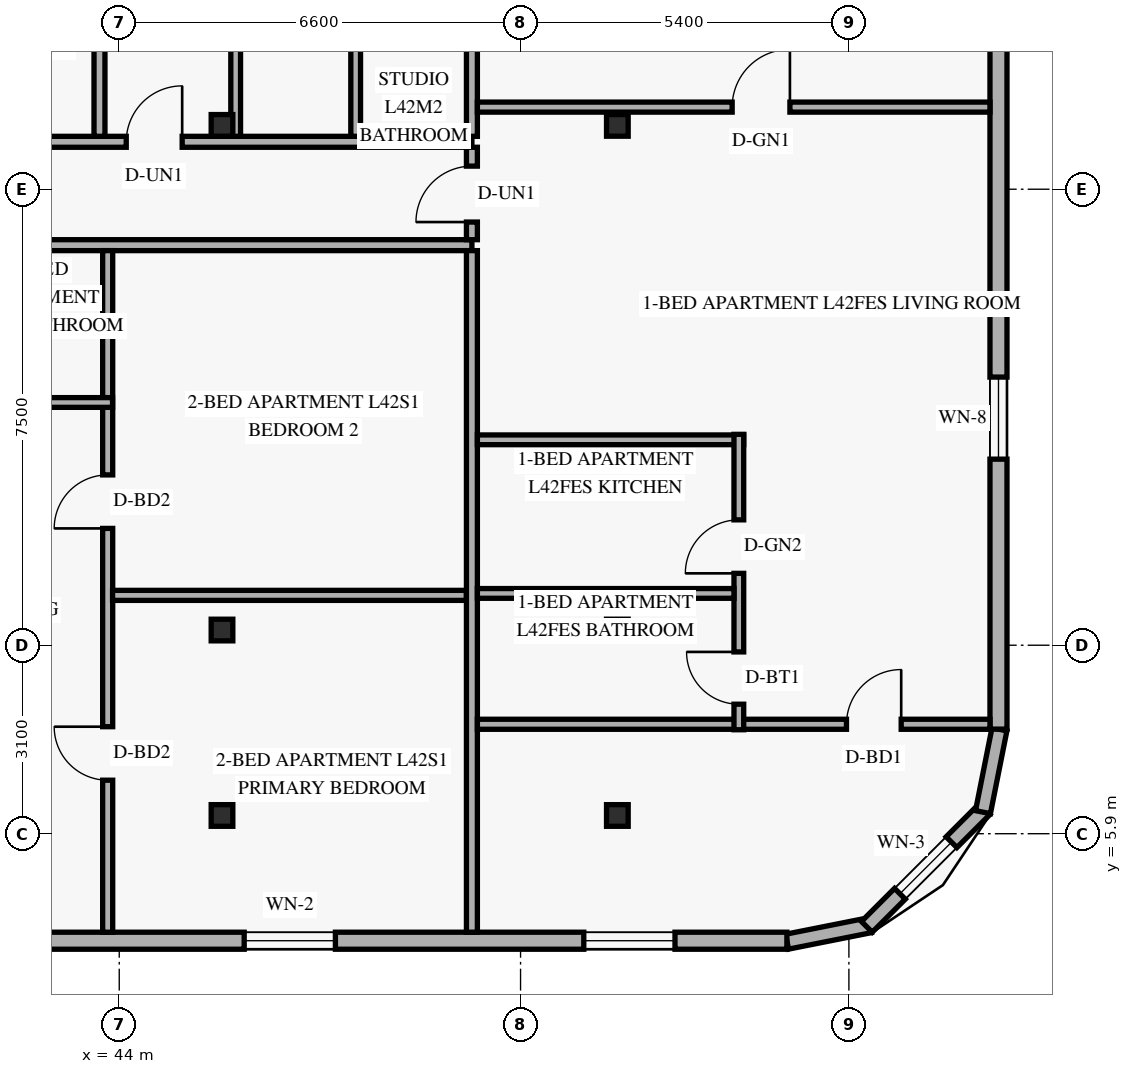
"""IFC4 building model, lengths in metres.
Left out: names, types, materials, properties, quantities, classifications, styles, units other than length and angle.
Written with IfcOpenShell. Run it as: python <this file> out.ifc"""

import sys

from ifc_helpers import new_model, si_unit, direction, frame, frame_2d, origin, origin_2d, place, context, subcontext, project, spatial, rectangle, hollow_rectangle, extrude, element, fill, save


model = new_model("IFC4")
c1 = context("Model", 3, precision=1e-05, world=origin(), true_north=direction((0.0, 1.0)))
c2 = subcontext(c1, "Body", "Model", "MODEL_VIEW")
j1 = project(units=[si_unit("LENGTHUNIT", "METRE"), si_unit("PLANEANGLEUNIT", "RADIAN")], contexts=[c1])
p1 = place(None, origin())
s1 = spatial("IfcSite", under=j1, at=p1, CompositionType="ELEMENT")
p2 = place(p1, origin())
s2 = spatial("IfcBuilding", under=s1, at=p2, CompositionType="ELEMENT")
p3 = place(p2, frame((0.0, 0.0, 162.6)))
s3 = spatial("IfcBuildingStorey", under=s2, at=p3, CompositionType="ELEMENT", Elevation=162.6)
for number, where, z_axis, x_axis in (
    (1, (45.627, 6.2, 0.0), (0.035, 0.0, 0.999), (0.0, 1.0, 0.0)),
    (2, (45.627, 9.25, 0.0), (0.035, 0.0, 0.999), (0.0, 1.0, 0.0)),
    (3, (45.627, 17.55, 0.0), (0.035, 0.0, 0.999), (0.0, 1.0, 0.0)),
):
    element("IfcColumn", number, at=place(p3, frame(where, z_axis=z_axis, x_axis=x_axis)), inside=s3, PredefinedType="COLUMN", context=c2, shape_type="SweptSolid", body=[
        extrude(hollow_rectangle(XDim=0.356, YDim=0.356, WallThickness=0.016, at=origin_2d()), origin(), (0.0, 0.0, 1.0), 3.602),
    ])
for number, where, z_axis, x_axis in (
    (4, (52.088, 6.2, 0.0), (0.058, 0.0, 0.998), (0.0, 1.0, 0.0)),
    (5, (52.088, 9.25, 0.0), (0.058, 0.0, 0.998), (0.0, 1.0, 0.0)),
    (6, (52.088, 17.55, 0.0), (0.058, 0.0, 0.998), (0.0, 1.0, 0.0)),
):
    element("IfcColumn", number, at=place(p3, frame(where, z_axis=z_axis, x_axis=x_axis)), inside=s3, PredefinedType="COLUMN", context=c2, shape_type="SweptSolid", body=[
        extrude(hollow_rectangle(XDim=0.356, YDim=0.356, WallThickness=0.016, at=origin_2d()), origin(), (0.0, 0.0, 1.0), 3.606),
    ])
p4 = place(p3, frame((54.983, 4.124, 0.0), z_axis=(0.0, 0.0, 1.0), x_axis=(0.980809899341, 0.19496651342, 0.0)))
e7 = element("IfcWall", 7, at=p4, inside=s3, PredefinedType="SOLIDWALL", context=c2, shape_type="SweptSolid", body=[
    extrude(rectangle(XDim=1.389, YDim=0.25, at=frame_2d((0.694, 0.0))), origin(), (0.0, 0.0, 1.0), 3.36),
])
p5 = place(p3, frame((56.295, 4.368, 0.0), z_axis=(0.0, 0.0, 1.0), x_axis=(0.707106781187, 0.707106781187, 0.0)))
e8 = element("IfcWall", 8, at=p5, inside=s3, PredefinedType="SOLIDWALL", context=c2, shape_type="SweptSolid", body=[
    extrude(rectangle(XDim=2.739, YDim=0.25, at=frame_2d((1.37, 0.0))), origin(), (0.0, 0.0, 1.0), 3.36),
])
p6 = place(p5, frame((0.77, 0.0, 0.85)))
e9 = element("IfcOpeningElement", 9, at=p6, cuts=e8, PredefinedType="OPENING", context=c2, shape_type="SweptSolid", body=[
    extrude(rectangle(XDim=1.2, YDim=1.5, at=frame_2d((0.6, 0.75))), frame((0.0, 0.135, 0.0), z_axis=(0.0, -1.0, 0.0), x_axis=(1.0, 0.0, 0.0)), (0.0, 0.0, 1.0), 0.27),
])
p7 = place(p3, frame((58.205, 6.254, 0.0), z_axis=(0.0, 0.0, 1.0), x_axis=(0.19496651342, 0.980809899341, 0.0)))
e10 = element("IfcWall", 10, at=p7, inside=s3, PredefinedType="SOLIDWALL", context=c2, shape_type="SweptSolid", body=[
    extrude(rectangle(XDim=1.389, YDim=0.25, at=frame_2d((0.694, 0.0))), origin(), (0.0, 0.0, 1.0), 3.36),
])
p8 = place(p3, frame((34.4, 4.14, 0.0), z_axis=(0.0, 0.0, 1.0), x_axis=(1.0, 0.0, 0.0)))
e11 = element("IfcWall", 11, at=p8, inside=s3, PredefinedType="SOLIDWALL", context=c2, shape_type="SweptSolid", body=[
    extrude(rectangle(XDim=20.58, YDim=0.28, at=frame_2d((10.29, 0.0))), origin(), (0.0, 0.0, 1.0), 3.36),
])
p9 = place(p8, frame((1.335, 0.0, 0.85)))
e12 = element("IfcOpeningElement", 12, at=p9, cuts=e11, PredefinedType="OPENING", context=c2, shape_type="SweptSolid", body=[
    extrude(rectangle(XDim=1.5, YDim=1.55, at=frame_2d((0.75, 0.775))), frame((0.0, 0.15, 0.0), z_axis=(0.0, -1.0, 0.0), x_axis=(1.0, 0.0, 0.0)), (0.0, 0.0, 1.0), 0.3),
])
p10 = place(p8, frame((5.53, 0.0, 0.85)))
e13 = element("IfcOpeningElement", 13, at=p10, cuts=e11, PredefinedType="OPENING", context=c2, shape_type="SweptSolid", body=[
    extrude(rectangle(XDim=1.5, YDim=1.55, at=frame_2d((0.75, 0.775))), frame((0.0, 0.15, 0.0), z_axis=(0.0, -1.0, 0.0), x_axis=(1.0, 0.0, 0.0)), (0.0, 0.0, 1.0), 0.3),
])
p11 = place(p8, frame((11.655, 0.0, 0.85)))
e14 = element("IfcOpeningElement", 14, at=p11, cuts=e11, PredefinedType="OPENING", context=c2, shape_type="SweptSolid", body=[
    extrude(rectangle(XDim=1.5, YDim=1.55, at=frame_2d((0.75, 0.775))), frame((0.0, 0.15, 0.0), z_axis=(0.0, -1.0, 0.0), x_axis=(1.0, 0.0, 0.0)), (0.0, 0.0, 1.0), 0.3),
])
p12 = place(p8, frame((17.24, 0.0, 0.85)))
e15 = element("IfcOpeningElement", 15, at=p12, cuts=e11, PredefinedType="OPENING", context=c2, shape_type="SweptSolid", body=[
    extrude(rectangle(XDim=1.5, YDim=1.55, at=frame_2d((0.75, 0.775))), frame((0.0, 0.15, 0.0), z_axis=(0.0, -1.0, 0.0), x_axis=(1.0, 0.0, 0.0)), (0.0, 0.0, 1.0), 0.3),
])
p13 = place(p3, frame((58.46, 7.62, 0.0), z_axis=(0.0, 0.0, 1.0), x_axis=(0.0, 1.0, 0.0)))
e16 = element("IfcWall", 16, at=p13, inside=s3, PredefinedType="SOLIDWALL", context=c2, shape_type="SweptSolid", body=[
    extrude(rectangle(XDim=32.76, YDim=0.28, at=frame_2d((16.38, 0.0))), origin(), (0.0, 0.0, 1.0), 3.36),
])
p14 = place(p13, frame((4.44, 0.0, 0.85)))
e17 = element("IfcOpeningElement", 17, at=p14, cuts=e16, PredefinedType="OPENING", context=c2, shape_type="SweptSolid", body=[
    extrude(rectangle(XDim=1.35, YDim=1.55, at=frame_2d((0.675, 0.775))), frame((0.0, 0.15, 0.0), z_axis=(0.0, -1.0, 0.0), x_axis=(1.0, 0.0, 0.0)), (0.0, 0.0, 1.0), 0.3),
])
p15 = place(p13, frame((12.23, 0.0, 0.85)))
e18 = element("IfcOpeningElement", 18, at=p15, cuts=e16, PredefinedType="OPENING", context=c2, shape_type="SweptSolid", body=[
    extrude(rectangle(XDim=1.35, YDim=1.55, at=frame_2d((0.675, 0.775))), frame((0.0, 0.15, 0.0), z_axis=(0.0, -1.0, 0.0), x_axis=(1.0, 0.0, 0.0)), (0.0, 0.0, 1.0), 0.3),
])
p16 = place(p13, frame((18.373, 0.0, 0.85)))
e19 = element("IfcOpeningElement", 19, at=p16, cuts=e16, PredefinedType="OPENING", context=c2, shape_type="SweptSolid", body=[
    extrude(rectangle(XDim=1.35, YDim=1.55, at=frame_2d((0.675, 0.775))), frame((0.0, 0.15, 0.0), z_axis=(0.0, -1.0, 0.0), x_axis=(1.0, 0.0, 0.0)), (0.0, 0.0, 1.0), 0.3),
])
p17 = place(p13, frame((26.963, 0.0, 0.85)))
e20 = element("IfcOpeningElement", 20, at=p17, cuts=e16, PredefinedType="OPENING", context=c2, shape_type="SweptSolid", body=[
    extrude(rectangle(XDim=1.35, YDim=1.55, at=frame_2d((0.675, 0.775))), frame((0.0, 0.15, 0.0), z_axis=(0.0, -1.0, 0.0), x_axis=(1.0, 0.0, 0.0)), (0.0, 0.0, 1.0), 0.3),
])
p18 = place(p3, frame((37.633, 15.58, 0.0), z_axis=(0.0, 0.0, 1.0), x_axis=(1.0, 0.0, 0.0)))
e21 = element("IfcWall", 21, at=p18, inside=s3, PredefinedType="STANDARD", context=c2, shape_type="SweptSolid", body=[
    extrude(rectangle(XDim=12.167, YDim=0.18, at=frame_2d((6.084, 0.0))), origin(), (0.0, 0.0, 1.0), 2.73),
])
p19 = place(p18, frame((0.327, 0.0, 0.0)))
e22 = element("IfcOpeningElement", 22, at=p19, cuts=e21, PredefinedType="OPENING", context=c2, shape_type="SweptSolid", body=[
    extrude(rectangle(XDim=0.92, YDim=2.15, at=frame_2d((0.46, 1.075))), frame((0.0, 0.1, 0.0), z_axis=(0.0, -1.0, 0.0), x_axis=(1.0, 0.0, 0.0)), (0.0, 0.0, 1.0), 0.2),
])
p20 = place(p3, frame((37.64, 17.28, 0.0), z_axis=(0.0, 0.0, 1.0), x_axis=(1.0, 0.0, 0.0)))
e23 = element("IfcWall", 23, at=p20, inside=s3, PredefinedType="STANDARD", context=c2, shape_type="SweptSolid", body=[
    extrude(rectangle(XDim=12.16, YDim=0.18, at=frame_2d((6.08, 0.0))), origin(), (0.0, 0.0, 1.0), 2.73),
])
p21 = place(p20, frame((6.475, 0.0, 0.0)))
e24 = element("IfcOpeningElement", 24, at=p21, cuts=e23, PredefinedType="OPENING", context=c2, shape_type="SweptSolid", body=[
    extrude(rectangle(XDim=0.92, YDim=2.15, at=frame_2d((0.46, 1.075))), frame((0.0, 0.1, 0.0), z_axis=(0.0, -1.0, 0.0), x_axis=(1.0, 0.0, 0.0)), (0.0, 0.0, 1.0), 0.2),
])
p22 = place(p3, frame((43.81, 4.28, 0.0), z_axis=(0.0, 0.0, 1.0), x_axis=(0.0, 1.0, 0.0)))
e25 = element("IfcWall", 25, at=p22, inside=s3, PredefinedType="PARTITIONING", context=c2, shape_type="SweptSolid", body=[
    extrude(rectangle(XDim=11.21, YDim=0.165, at=frame_2d((5.605, 0.0))), origin(), (0.0, 0.0, 1.0), 2.73),
])
p23 = place(p22, frame((2.5, 0.0, 0.0)))
e26 = element("IfcOpeningElement", 26, at=p23, cuts=e25, PredefinedType="OPENING", context=c2, shape_type="SweptSolid", body=[
    extrude(rectangle(XDim=0.88, YDim=2.14, at=frame_2d((0.44, 1.07))), frame((0.0, 0.093, 0.0), z_axis=(0.0, -1.0, 0.0), x_axis=(1.0, 0.0, 0.0)), (0.0, 0.0, 1.0), 0.185),
])
p24 = place(p22, frame((6.641, 0.0, 0.0)))
e27 = element("IfcOpeningElement", 27, at=p24, cuts=e25, PredefinedType="OPENING", context=c2, shape_type="SweptSolid", body=[
    extrude(rectangle(XDim=0.88, YDim=2.14, at=frame_2d((0.44, 1.07))), frame((0.0, 0.093, 0.0), z_axis=(0.0, -1.0, 0.0), x_axis=(1.0, 0.0, 0.0)), (0.0, 0.0, 1.0), 0.185),
])
p25 = place(p3, frame((39.18, 12.992, 0.0), z_axis=(0.0, 0.0, 1.0), x_axis=(1.0, 0.0, 0.0)))
e28 = element("IfcWall", 28, at=p25, inside=s3, PredefinedType="PLUMBINGWALL", context=c2, shape_type="SweptSolid", body=[
    extrude(rectangle(XDim=4.71, YDim=0.16, at=frame_2d((2.355, 0.0))), origin(), (0.0, 0.0, 1.0), 3.36),
])
p26 = place(p25, frame((0.38, 0.0, 0.0)))
e29 = element("IfcOpeningElement", 29, at=p26, cuts=e28, PredefinedType="OPENING", context=c2, shape_type="SweptSolid", body=[
    extrude(rectangle(XDim=0.88, YDim=2.12, at=frame_2d((0.44, 1.06))), frame((0.0, 0.09, 0.0), z_axis=(0.0, -1.0, 0.0), x_axis=(1.0, 0.0, 0.0)), (0.0, 0.0, 1.0), 0.18),
])
p27 = place(p25, frame((2.786, 0.0, 0.0)))
e30 = element("IfcOpeningElement", 30, at=p27, cuts=e28, PredefinedType="OPENING", context=c2, shape_type="SweptSolid", body=[
    extrude(rectangle(XDim=0.86, YDim=2.12, at=frame_2d((0.43, 1.06))), frame((0.0, 0.09, 0.0), z_axis=(0.0, -1.0, 0.0), x_axis=(1.0, 0.0, 0.0)), (0.0, 0.0, 1.0), 0.18),
])
p28 = place(p3, frame((43.89, 9.82, 0.0), z_axis=(0.0, 0.0, 1.0), x_axis=(1.0, 0.0, 0.0)))
e31 = element("IfcWall", 31, at=p28, inside=s3, PredefinedType="PARTITIONING", context=c2, shape_type="SweptSolid", body=[
    extrude(rectangle(XDim=5.82, YDim=0.165, at=frame_2d((2.91, 0.0))), origin(), (0.0, 0.0, 1.0), 2.73),
])
p29 = place(p3, frame((43.675, 17.37, 0.0), z_axis=(0.0, 0.0, 1.0), x_axis=(0.0, 1.0, 0.0)))
e32 = element("IfcWall", 32, at=p29, inside=s3, PredefinedType="PARTITIONING", context=c2, shape_type="SweptSolid", body=[
    extrude(rectangle(XDim=10.1, YDim=0.18, at=frame_2d((5.05, 0.0))), origin(), (0.0, 0.0, 1.0), 2.73),
])
p30 = place(p3, frame((45.915, 17.37, 0.0), z_axis=(0.0, 0.0, 1.0), x_axis=(0.0, 1.0, 0.0)))
e33 = element("IfcWall", 33, at=p30, inside=s3, PredefinedType="PLUMBINGWALL", context=c2, shape_type="SweptSolid", body=[
    extrude(rectangle(XDim=2.43, YDim=0.16, at=frame_2d((1.215, 0.0))), origin(), (0.0, 0.0, 1.0), 2.73),
])
p31 = place(p3, frame((47.888, 17.37, 0.0), z_axis=(0.0, 0.0, 1.0), x_axis=(0.0, 1.0, 0.0)))
e34 = element("IfcWall", 34, at=p31, inside=s3, PredefinedType="PLUMBINGWALL", context=c2, shape_type="SweptSolid", body=[
    extrude(rectangle(XDim=2.27, YDim=0.16, at=frame_2d((1.135, 0.0))), origin(), (0.0, 0.0, 1.0), 2.73),
])
p32 = place(p3, frame((49.8, 15.67, 0.0), z_axis=(0.0, 0.0, 1.0), x_axis=(0.0, 1.0, 0.0)))
e35 = element("IfcWall", 35, at=p32, inside=s3, PredefinedType="STANDARD", context=c2, shape_type="SweptSolid", body=[
    extrude(rectangle(XDim=1.52, YDim=0.18, at=frame_2d((0.76, 0.0))), origin(), (0.0, 0.0, 1.0), 3.36),
])
p33 = place(p32, frame((0.29, 0.0, 0.0)))
e36 = element("IfcOpeningElement", 36, at=p33, cuts=e35, PredefinedType="OPENING", context=c2, shape_type="SweptSolid", body=[
    extrude(rectangle(XDim=0.92, YDim=2.15, at=frame_2d((0.46, 1.075))), frame((0.0, 0.1, 0.0), z_axis=(0.0, -1.0, 0.0), x_axis=(1.0, 0.0, 0.0)), (0.0, 0.0, 1.0), 0.2),
])
p34 = place(p3, frame((49.8, 4.28, 0.0), z_axis=(0.0, 0.0, 1.0), x_axis=(0.0, 1.0, 0.0)))
e37 = element("IfcWall", 37, at=p34, inside=s3, PredefinedType="PARTITIONING", context=c2, shape_type="SweptSolid", body=[
    extrude(rectangle(XDim=11.21, YDim=0.18, at=frame_2d((5.605, 0.0))), origin(), (0.0, 0.0, 1.0), 2.73),
])
p35 = place(p3, frame((49.8, 17.37, 0.0), z_axis=(0.0, 0.0, 1.0), x_axis=(0.0, 1.0, 0.0)))
e38 = element("IfcWall", 38, at=p35, inside=s3, PredefinedType="PARTITIONING", context=c2, shape_type="SweptSolid", body=[
    extrude(rectangle(XDim=10.1, YDim=0.18, at=frame_2d((5.05, 0.0))), origin(), (0.0, 0.0, 1.0), 2.73),
])
p36 = place(p3, frame((49.89, 7.7, 0.0), z_axis=(0.0, 0.0, 1.0), x_axis=(1.0, 0.0, 0.0)))
e39 = element("IfcWall", 39, at=p36, inside=s3, PredefinedType="PARTITIONING", context=c2, shape_type="SweptSolid", body=[
    extrude(rectangle(XDim=8.43, YDim=0.165, at=frame_2d((4.215, 0.0))), origin(), (0.0, 0.0, 1.0), 2.879),
])
p37 = place(p36, frame((6.07, 0.0, 0.0)))
e40 = element("IfcOpeningElement", 40, at=p37, cuts=e39, PredefinedType="OPENING", context=c2, shape_type="SweptSolid", body=[
    extrude(rectangle(XDim=0.9, YDim=2.14, at=frame_2d((0.45, 1.07))), frame((0.0, 0.093, 0.0), z_axis=(0.0, -1.0, 0.0), x_axis=(1.0, 0.0, 0.0)), (0.0, 0.0, 1.0), 0.185),
])
p38 = place(p3, frame((49.89, 12.378, 0.0), z_axis=(0.0, 0.0, 1.0), x_axis=(1.0, 0.0, 0.0)))
e41 = element("IfcWall", 41, at=p38, inside=s3, PredefinedType="PLUMBINGWALL", context=c2, shape_type="SweptSolid", body=[
    extrude(rectangle(XDim=4.38, YDim=0.16, at=frame_2d((2.19, 0.0))), origin(), (0.0, 0.0, 1.0), 2.879),
])
p39 = place(p3, frame((54.19, 7.61, 0.0), z_axis=(0.0, 0.0, 1.0), x_axis=(0.0, 1.0, 0.0)))
e42 = element("IfcWall", 42, at=p39, inside=s3, PredefinedType="PLUMBINGWALL", context=c2, shape_type="SweptSolid", body=[
    extrude(rectangle(XDim=4.858, YDim=0.16, at=frame_2d((2.429, 0.0))), origin(), (0.0, 0.0, 1.0), 3.36),
])
p40 = place(p39, frame((0.42, 0.0, 0.0)))
e43 = element("IfcOpeningElement", 43, at=p40, cuts=e42, PredefinedType="OPENING", context=c2, shape_type="SweptSolid", body=[
    extrude(rectangle(XDim=0.86, YDim=2.12, at=frame_2d((0.43, 1.06))), frame((0.0, 0.09, 0.0), z_axis=(0.0, -1.0, 0.0), x_axis=(1.0, 0.0, 0.0)), (0.0, 0.0, 1.0), 0.18),
])
p41 = place(p39, frame((2.572, 0.0, 0.0)))
e44 = element("IfcOpeningElement", 44, at=p41, cuts=e42, PredefinedType="OPENING", context=c2, shape_type="SweptSolid", body=[
    extrude(rectangle(XDim=0.88, YDim=2.12, at=frame_2d((0.44, 1.06))), frame((0.0, 0.09, 0.0), z_axis=(0.0, -1.0, 0.0), x_axis=(1.0, 0.0, 0.0)), (0.0, 0.0, 1.0), 0.18),
])
p42 = place(p3, frame((49.89, 9.852, 0.0), z_axis=(0.0, 0.0, 1.0), x_axis=(1.0, 0.0, 0.0)))
e45 = element("IfcWall", 45, at=p42, inside=s3, PredefinedType="PLUMBINGWALL", context=c2, shape_type="SweptSolid", body=[
    extrude(rectangle(XDim=4.22, YDim=0.16, at=frame_2d((2.11, 0.0))), origin(), (0.0, 0.0, 1.0), 2.879),
])
p43 = place(p3, frame((49.89, 17.851, 0.0), z_axis=(0.0, 0.0, 1.0), x_axis=(1.0, 0.0, 0.0)))
e46 = element("IfcWall", 46, at=p43, inside=s3, PredefinedType="PARTITIONING", context=c2, shape_type="SweptSolid", body=[
    extrude(rectangle(XDim=8.43, YDim=0.165, at=frame_2d((4.215, 0.0))), origin(), (0.0, 0.0, 1.0), 2.879),
])
p44 = place(p43, frame((4.19, 0.0, 0.0)))
e47 = element("IfcOpeningElement", 47, at=p44, cuts=e46, PredefinedType="OPENING", context=c2, shape_type="SweptSolid", body=[
    extrude(rectangle(XDim=0.95, YDim=2.15, at=frame_2d((0.475, 1.075))), frame((0.0, 0.093, 0.0), z_axis=(0.0, -1.0, 0.0), x_axis=(1.0, 0.0, 0.0)), (0.0, 0.0, 1.0), 0.185),
])
p45 = place(p6, origin())
e48 = element("IfcWindow", 48, at=p45, inside=s3, PartitioningType="SINGLE_PANEL", PredefinedType="WINDOW", context=c2, shape_type="SweptSolid", body=[
    extrude(rectangle(XDim=1.2, YDim=1.5, at=frame_2d((0.6, 0.75))), frame((0.0, 0.03, 0.0), z_axis=(0.0, -1.0, 0.0), x_axis=(1.0, 0.0, 0.0)), (0.0, 0.0, 1.0), 0.06),
])
fill(e9, e48)
p46 = place(p11, origin())
e49 = element("IfcWindow", 49, at=p46, inside=s3, PartitioningType="SINGLE_PANEL", PredefinedType="WINDOW", context=c2, shape_type="SweptSolid", body=[
    extrude(rectangle(XDim=1.5, YDim=1.55, at=frame_2d((0.75, 0.775))), frame((0.0, 0.03, 0.0), z_axis=(0.0, -1.0, 0.0), x_axis=(1.0, 0.0, 0.0)), (0.0, 0.0, 1.0), 0.06),
])
fill(e14, e49)
p47 = place(p12, origin())
e50 = element("IfcWindow", 50, at=p47, inside=s3, PartitioningType="SINGLE_PANEL", PredefinedType="WINDOW", context=c2, shape_type="SweptSolid", body=[
    extrude(rectangle(XDim=1.5, YDim=1.55, at=frame_2d((0.75, 0.775))), frame((0.0, 0.03, 0.0), z_axis=(0.0, -1.0, 0.0), x_axis=(1.0, 0.0, 0.0)), (0.0, 0.0, 1.0), 0.06),
])
fill(e15, e50)
p48 = place(p14, origin())
e51 = element("IfcWindow", 51, at=p48, inside=s3, PartitioningType="SINGLE_PANEL", PredefinedType="WINDOW", context=c2, shape_type="SweptSolid", body=[
    extrude(rectangle(XDim=1.35, YDim=1.55, at=frame_2d((0.675, 0.775))), frame((0.0, 0.03, 0.0), z_axis=(0.0, -1.0, 0.0), x_axis=(1.0, 0.0, 0.0)), (0.0, 0.0, 1.0), 0.06),
])
fill(e17, e51)
p49 = place(p23, origin())
e52 = element("IfcDoor", 52, at=p49, inside=s3, OperationType="SINGLE_SWING_RIGHT", PredefinedType="DOOR", context=c2, shape_type="SweptSolid", body=[
    extrude(rectangle(XDim=0.88, YDim=2.14, at=frame_2d((0.44, 1.07))), frame((0.0, 0.025, 0.0), z_axis=(0.0, -1.0, 0.0), x_axis=(1.0, 0.0, 0.0)), (0.0, 0.0, 1.0), 0.05),
])
fill(e26, e52)
p50 = place(p24, origin())
e53 = element("IfcDoor", 53, at=p50, inside=s3, OperationType="SINGLE_SWING_LEFT", PredefinedType="DOOR", context=c2, shape_type="SweptSolid", body=[
    extrude(rectangle(XDim=0.88, YDim=2.14, at=frame_2d((0.44, 1.07))), frame((0.0, 0.025, 0.0), z_axis=(0.0, -1.0, 0.0), x_axis=(1.0, 0.0, 0.0)), (0.0, 0.0, 1.0), 0.05),
])
fill(e27, e53)
p51 = place(p21, origin())
e54 = element("IfcDoor", 54, at=p51, inside=s3, OperationType="SINGLE_SWING_RIGHT", PredefinedType="DOOR", context=c2, shape_type="SweptSolid", body=[
    extrude(rectangle(XDim=0.92, YDim=2.15, at=frame_2d((0.46, 1.075))), frame((0.0, 0.025, 0.0), z_axis=(0.0, -1.0, 0.0), x_axis=(1.0, 0.0, 0.0)), (0.0, 0.0, 1.0), 0.05),
])
fill(e24, e54)
p52 = place(p44, origin())
e55 = element("IfcDoor", 55, at=p52, inside=s3, OperationType="SINGLE_SWING_RIGHT", PredefinedType="DOOR", context=c2, shape_type="SweptSolid", body=[
    extrude(rectangle(XDim=0.95, YDim=2.15, at=frame_2d((0.475, 1.075))), frame((0.0, 0.025, 0.0), z_axis=(0.0, -1.0, 0.0), x_axis=(1.0, 0.0, 0.0)), (0.0, 0.0, 1.0), 0.05),
])
fill(e47, e55)
p53 = place(p33, origin())
e56 = element("IfcDoor", 56, at=p53, inside=s3, OperationType="SINGLE_SWING_LEFT", PredefinedType="DOOR", context=c2, shape_type="SweptSolid", body=[
    extrude(rectangle(XDim=0.92, YDim=2.15, at=frame_2d((0.46, 1.075))), frame((0.0, 0.025, 0.0), z_axis=(0.0, -1.0, 0.0), x_axis=(1.0, 0.0, 0.0)), (0.0, 0.0, 1.0), 0.05),
])
fill(e36, e56)
p54 = place(p40, origin())
e57 = element("IfcDoor", 57, at=p54, inside=s3, OperationType="SINGLE_SWING_RIGHT", PredefinedType="DOOR", context=c2, shape_type="SweptSolid", body=[
    extrude(rectangle(XDim=0.86, YDim=2.12, at=frame_2d((0.43, 1.06))), frame((0.0, 0.025, 0.0), z_axis=(0.0, -1.0, 0.0), x_axis=(1.0, 0.0, 0.0)), (0.0, 0.0, 1.0), 0.05),
])
fill(e43, e57)
p55 = place(p41, origin())
e58 = element("IfcDoor", 58, at=p55, inside=s3, OperationType="SINGLE_SWING_LEFT", PredefinedType="DOOR", context=c2, shape_type="SweptSolid", body=[
    extrude(rectangle(XDim=0.88, YDim=2.12, at=frame_2d((0.44, 1.06))), frame((0.0, 0.025, 0.0), z_axis=(0.0, -1.0, 0.0), x_axis=(1.0, 0.0, 0.0)), (0.0, 0.0, 1.0), 0.05),
])
fill(e44, e58)
p56 = place(p37, origin())
e59 = element("IfcDoor", 59, at=p56, inside=s3, OperationType="SINGLE_SWING_RIGHT", PredefinedType="DOOR", context=c2, shape_type="SweptSolid", body=[
    extrude(rectangle(XDim=0.9, YDim=2.14, at=frame_2d((0.45, 1.07))), frame((0.0, 0.025, 0.0), z_axis=(0.0, -1.0, 0.0), x_axis=(1.0, 0.0, 0.0)), (0.0, 0.0, 1.0), 0.05),
])
fill(e40, e59)
save(model, sys.argv[1])
